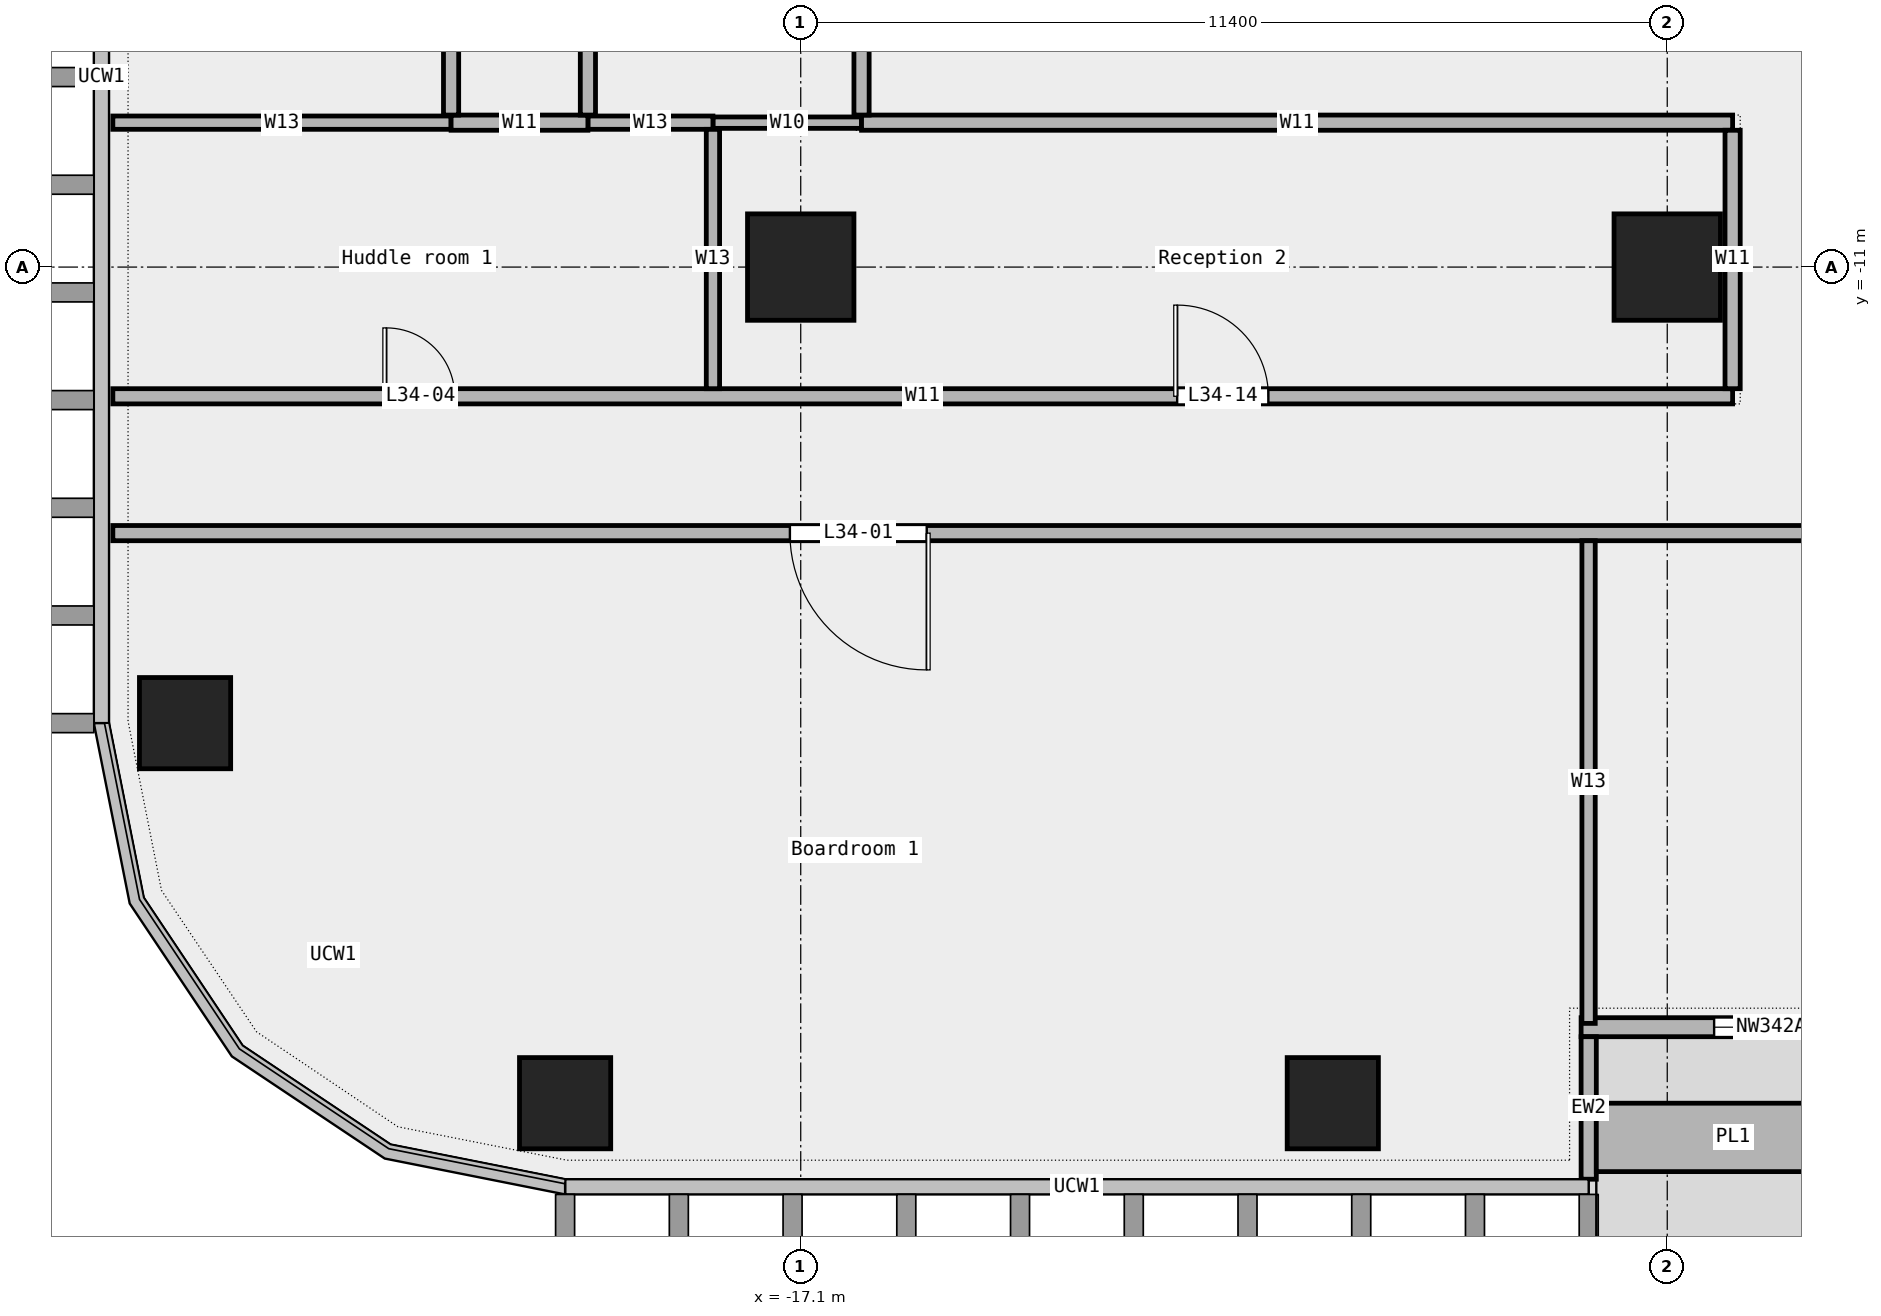
"""IFC4 building model, lengths in metres.
Left out: names, types, materials, properties, quantities, classifications, styles, units other than length and angle.
Written with IfcOpenShell. Run it as: python <this file> out.ifc"""

import sys

from ifc_helpers import new_model, si_unit, direction, frame, frame_2d, origin, origin_2d, place, context, subcontext, project, spatial, rectangle, extrude, element, fill, save


model = new_model("IFC4")
c1 = context("Model", 3, precision=1e-05, world=origin(), true_north=direction((0.0, 1.0)))
c2 = subcontext(c1, "Body", "Model", "MODEL_VIEW")
j1 = project(units=[si_unit("LENGTHUNIT", "METRE"), si_unit("PLANEANGLEUNIT", "RADIAN")], contexts=[c1])
p1 = place(None, origin())
s1 = spatial("IfcSite", under=j1, at=p1, CompositionType="ELEMENT")
p2 = place(p1, origin())
s2 = spatial("IfcBuilding", under=s1, at=p2, CompositionType="ELEMENT")
p3 = place(p2, frame((0.0, 0.0, 169.0)))
s3 = spatial("IfcBuildingStorey", under=s2, at=p3, CompositionType="ELEMENT", Elevation=169.0)
for number, where, z_axis, x_axis in (
    (1, (-20.2, -22.0, 0.0), (0.0, 0.0, 1.0), (1.0, 0.0, 0.0)),
    (2, (-10.1, -22.0, 0.0), (0.0, 0.0, 1.0), (1.0, 0.0, 0.0)),
    (3, (-25.2, -17.0, 0.0), (0.0, 0.0, 1.0), (1.0, 0.0, 0.0)),
):
    element("IfcColumn", number, at=place(p3, frame(where, z_axis=z_axis, x_axis=x_axis)), inside=s3, PredefinedType="COLUMN", context=c2, shape_type="SweptSolid", body=[
        extrude(rectangle(XDim=1.2, YDim=1.2, at=origin_2d()), origin(), (0.0, 0.0, 1.0), 3.6),
    ])
for number, where, z_axis, x_axis in (
    (4, (-17.1, -11.0, 0.0), (0.0, 0.0, 1.0), (1.0, 0.0, 0.0)),
    (5, (-5.7, -11.0, 0.0), (0.0, 0.0, 1.0), (1.0, 0.0, 0.0)),
):
    element("IfcColumn", number, at=place(p3, frame(where, z_axis=z_axis, x_axis=x_axis)), inside=s3, PredefinedType="COLUMN", context=c2, shape_type="SweptSolid", body=[
        extrude(rectangle(XDim=1.4, YDim=1.4, at=origin_2d()), origin(), (0.0, 0.0, 1.0), 3.6),
    ])
p4 = place(p3, frame((-6.833, -21.0, 0.0), z_axis=(0.0, 0.0, 1.0), x_axis=(1.0, 0.0, 0.0)))
e6 = element("IfcWall", 6, at=p4, inside=s3, PredefinedType="STANDARD", context=c2, shape_type="SweptSolid", body=[
    extrude(rectangle(XDim=13.667, YDim=0.25, at=frame_2d((6.833, 0.0))), origin(), (0.0, 0.0, 1.0), 3.6),
])
p5 = place(p4, frame((1.75, 0.0, 0.45)))
e7 = element("IfcOpeningElement", 7, at=p5, cuts=e6, PredefinedType="OPENING", context=c2, shape_type="SweptSolid", body=[
    extrude(rectangle(XDim=1.5, YDim=2.4, at=frame_2d((0.75, 1.2))), frame((0.0, 0.137, 0.0), z_axis=(0.0, -1.0, 0.0), x_axis=(1.0, 0.0, 0.0)), (0.0, 0.0, 1.0), 0.274),
])
p6 = place(p4, frame((7.75, 0.0, 0.0)))
e8 = element("IfcOpeningElement", 8, at=p6, cuts=e6, PredefinedType="OPENING", context=c2, shape_type="SweptSolid", body=[
    extrude(rectangle(XDim=1.8, YDim=2.4, at=frame_2d((0.9, 1.2))), frame((0.0, 0.137, 0.0), z_axis=(0.0, -1.0, 0.0), x_axis=(1.0, 0.0, 0.0)), (0.0, 0.0, 1.0), 0.274),
])
p7 = place(p4, frame((10.5, 0.0, 0.45)))
e9 = element("IfcOpeningElement", 9, at=p7, cuts=e6, PredefinedType="OPENING", context=c2, shape_type="SweptSolid", body=[
    extrude(rectangle(XDim=1.5, YDim=2.4, at=frame_2d((0.75, 1.2))), frame((0.0, 0.137, 0.0), z_axis=(0.0, -1.0, 0.0), x_axis=(1.0, 0.0, 0.0)), (0.0, 0.0, 1.0), 0.274),
])
p8 = place(p3, frame((-6.733, -23.0, 0.0), z_axis=(0.0, 0.0, 1.0), x_axis=(0.0, 1.0, 0.0)))
e10 = element("IfcWall", 10, at=p8, inside=s3, PredefinedType="STANDARD", context=c2, shape_type="SweptSolid", body=[
    extrude(rectangle(XDim=1.875, YDim=0.2, at=frame_2d((0.938, 0.0))), origin(), (0.0, 0.0, 1.0), 3.6),
])
p9 = place(p3, frame((-6.633, -22.45, 0.0), z_axis=(0.0, 0.0, 1.0), x_axis=(1.0, 0.0, 0.0)))
e11 = element("IfcWall", 11, at=p9, inside=s3, PredefinedType="STANDARD", context=c2, shape_type="SweptSolid", body=[
    extrude(rectangle(XDim=3.6, YDim=0.9, at=frame_2d((1.8, 0.0))), origin(), (0.0, 0.0, 1.0), 0.7),
])
p10 = place(p3, frame((-26.15, -14.5, 0.0), z_axis=(0.0, 0.0, 1.0), x_axis=(1.0, 0.0, 0.0)))
e12 = element("IfcWall", 12, at=p10, inside=s3, PredefinedType="PARTITIONING", context=c2, shape_type="SweptSolid", body=[
    extrude(rectangle(XDim=52.3, YDim=0.2, at=frame_2d((26.15, 0.0))), origin(), (0.0, 0.0, 1.0), 3.6),
])
p11 = place(p10, frame((8.907, 0.0, 0.0)))
e13 = element("IfcOpeningElement", 13, at=p11, cuts=e12, PredefinedType="OPENING", context=c2, shape_type="SweptSolid", body=[
    extrude(rectangle(XDim=1.8, YDim=2.1, at=frame_2d((0.9, 1.05))), frame((0.0, 0.112, 0.0), z_axis=(0.0, -1.0, 0.0), x_axis=(1.0, 0.0, 0.0)), (0.0, 0.0, 1.0), 0.224),
])
p12 = place(p10, frame((25.55, 0.0, 0.0)))
e14 = element("IfcOpeningElement", 14, at=p12, cuts=e12, PredefinedType="OPENING", context=c2, shape_type="SweptSolid", body=[
    extrude(rectangle(XDim=1.2, YDim=2.1, at=frame_2d((0.6, 1.05))), frame((0.0, 0.112, 0.0), z_axis=(0.0, -1.0, 0.0), x_axis=(1.0, 0.0, 0.0)), (0.0, 0.0, 1.0), 0.224),
])
p13 = place(p10, frame((41.593, 0.0, 0.0)))
e15 = element("IfcOpeningElement", 15, at=p13, cuts=e12, PredefinedType="OPENING", context=c2, shape_type="SweptSolid", body=[
    extrude(rectangle(XDim=1.8, YDim=2.1, at=frame_2d((0.9, 1.05))), frame((0.0, 0.112, 0.0), z_axis=(0.0, -1.0, 0.0), x_axis=(1.0, 0.0, 0.0)), (0.0, 0.0, 1.0), 0.224),
])
p14 = place(p3, frame((-26.15, -12.7, 0.0), z_axis=(0.0, 0.0, 1.0), x_axis=(1.0, 0.0, 0.0)))
e16 = element("IfcWall", 16, at=p14, inside=s3, PredefinedType="PARTITIONING", context=c2, shape_type="SweptSolid", body=[
    extrude(rectangle(XDim=21.31, YDim=0.2, at=frame_2d((10.655, 0.0))), origin(), (0.0, 0.0, 1.0), 3.6),
])
p15 = place(p14, frame((3.597, 0.0, 0.0)))
e17 = element("IfcOpeningElement", 17, at=p15, cuts=e16, PredefinedType="OPENING", context=c2, shape_type="SweptSolid", body=[
    extrude(rectangle(XDim=0.9, YDim=2.1, at=frame_2d((0.45, 1.05))), frame((0.0, 0.112, 0.0), z_axis=(0.0, -1.0, 0.0), x_axis=(1.0, 0.0, 0.0)), (0.0, 0.0, 1.0), 0.224),
])
p16 = place(p14, frame((14.002, 0.0, 0.0)))
e18 = element("IfcOpeningElement", 18, at=p16, cuts=e16, PredefinedType="OPENING", context=c2, shape_type="SweptSolid", body=[
    extrude(rectangle(XDim=1.2, YDim=2.1, at=frame_2d((0.6, 1.05))), frame((0.0, 0.112, 0.0), z_axis=(0.0, -1.0, 0.0), x_axis=(1.0, 0.0, 0.0)), (0.0, 0.0, 1.0), 0.224),
])
p17 = place(p3, frame((-18.255, -9.1, 0.0), z_axis=(0.0, 0.0, 1.0), x_axis=(1.0, 0.0, 0.0)))
e19 = element("IfcWall", 19, at=p17, inside=s3, PredefinedType="PARTITIONING", context=c2, shape_type="SweptSolid", body=[
    extrude(rectangle(XDim=1.955, YDim=0.15, at=frame_2d((0.978, 0.0))), origin(), (0.0, 0.0, 1.0), 3.6),
])
p18 = place(p3, frame((-26.15, -9.1, 0.0), z_axis=(0.0, 0.0, 1.0), x_axis=(1.0, 0.0, 0.0)))
e20 = element("IfcWall", 20, at=p18, inside=s3, PredefinedType="PARTITIONING", context=c2, shape_type="SweptSolid", body=[
    extrude(rectangle(XDim=4.45, YDim=0.175, at=frame_2d((2.225, 0.0))), origin(), (0.0, 0.0, 1.0), 3.6),
])
p19 = place(p3, frame((-19.9, -9.1, 0.0), z_axis=(0.0, 0.0, 1.0), x_axis=(1.0, 0.0, 0.0)))
e21 = element("IfcWall", 21, at=p19, inside=s3, PredefinedType="PARTITIONING", context=c2, shape_type="SweptSolid", body=[
    extrude(rectangle(XDim=1.645, YDim=0.175, at=frame_2d((0.823, 0.0))), origin(), (0.0, 0.0, 1.0), 3.6),
])
p20 = place(p3, frame((-21.7, -9.1, 0.0), z_axis=(0.0, 0.0, 1.0), x_axis=(1.0, 0.0, 0.0)))
e22 = element("IfcWall", 22, at=p20, inside=s3, PredefinedType="PARTITIONING", context=c2, shape_type="SweptSolid", body=[
    extrude(rectangle(XDim=1.8, YDim=0.2, at=frame_2d((0.9, 0.0))), origin(), (0.0, 0.0, 1.0), 3.6),
])
p21 = place(p3, frame((-16.3, -9.1, 0.0), z_axis=(0.0, 0.0, 1.0), x_axis=(1.0, 0.0, 0.0)))
e23 = element("IfcWall", 23, at=p21, inside=s3, PredefinedType="PARTITIONING", context=c2, shape_type="SweptSolid", body=[
    extrude(rectangle(XDim=11.46, YDim=0.2, at=frame_2d((5.73, 0.0))), origin(), (0.0, 0.0, 1.0), 3.6),
])
p22 = place(p3, frame((-21.7, -9.0, 0.0), z_axis=(0.0, 0.0, 1.0), x_axis=(0.0, 1.0, 0.0)))
e24 = element("IfcWall", 24, at=p22, inside=s3, PredefinedType="PARTITIONING", context=c2, shape_type="SweptSolid", body=[
    extrude(rectangle(XDim=24.3, YDim=0.2, at=frame_2d((12.15, 0.0))), origin(), (0.0, 0.0, 1.0), 3.6),
])
p23 = place(p22, frame((14.925, 0.0, 0.0)))
e25 = element("IfcOpeningElement", 25, at=p23, cuts=e24, PredefinedType="OPENING", context=c2, shape_type="SweptSolid", body=[
    extrude(rectangle(XDim=0.9, YDim=2.1, at=frame_2d((0.45, 1.05))), frame((0.0, 0.112, 0.0), z_axis=(0.0, -1.0, 0.0), x_axis=(1.0, 0.0, 0.0)), (0.0, 0.0, 1.0), 0.224),
])
p24 = place(p22, frame((2.562, 0.0, 0.0)))
e26 = element("IfcOpeningElement", 26, at=p24, cuts=e24, PredefinedType="OPENING", context=c2, shape_type="SweptSolid", body=[
    extrude(rectangle(XDim=0.9, YDim=2.1, at=frame_2d((0.45, 1.05))), frame((0.0, 0.112, 0.0), z_axis=(0.0, -1.0, 0.0), x_axis=(1.0, 0.0, 0.0)), (0.0, 0.0, 1.0), 0.224),
])
p25 = place(p3, frame((-19.9, -9.0, 0.0), z_axis=(0.0, 0.0, 1.0), x_axis=(0.0, 1.0, 0.0)))
e27 = element("IfcWall", 27, at=p25, inside=s3, PredefinedType="PARTITIONING", context=c2, shape_type="SweptSolid", body=[
    extrude(rectangle(XDim=13.6, YDim=0.2, at=frame_2d((6.8, 0.0))), origin(), (0.0, 0.0, 1.0), 3.6),
])
p26 = place(p3, frame((-18.255, -12.6, 0.0), z_axis=(0.0, 0.0, 1.0), x_axis=(0.0, 1.0, 0.0)))
e28 = element("IfcWall", 28, at=p26, inside=s3, PredefinedType="PARTITIONING", context=c2, shape_type="SweptSolid", body=[
    extrude(rectangle(XDim=3.412, YDim=0.175, at=frame_2d((1.706, 0.0))), origin(), (0.0, 0.0, 1.0), 3.6),
])
p27 = place(p3, frame((-16.3, -9.0, 0.0), z_axis=(0.0, 0.0, 1.0), x_axis=(0.0, 1.0, 0.0)))
e29 = element("IfcWall", 29, at=p27, inside=s3, PredefinedType="PARTITIONING", context=c2, shape_type="SweptSolid", body=[
    extrude(rectangle(XDim=8.3, YDim=0.2, at=frame_2d((4.15, 0.0))), origin(), (0.0, 0.0, 1.0), 3.6),
])
p28 = place(p27, frame((3.442, 0.0, 0.0)))
e30 = element("IfcOpeningElement", 30, at=p28, cuts=e29, PredefinedType="OPENING", context=c2, shape_type="SweptSolid", body=[
    extrude(rectangle(XDim=0.9, YDim=2.1, at=frame_2d((0.45, 1.05))), frame((0.0, 0.112, 0.0), z_axis=(0.0, -1.0, 0.0), x_axis=(1.0, 0.0, 0.0)), (0.0, 0.0, 1.0), 0.224),
])
p29 = place(p3, frame((-6.735, -20.95, 0.0), z_axis=(0.0, 0.0, 1.0), x_axis=(0.0, 1.0, 0.0)))
e31 = element("IfcWall", 31, at=p29, inside=s3, PredefinedType="PARTITIONING", context=c2, shape_type="SweptSolid", body=[
    extrude(rectangle(XDim=6.35, YDim=0.175, at=frame_2d((3.175, 0.0))), origin(), (0.0, 0.0, 1.0), 3.6),
])
p30 = place(p3, frame((-4.84, -12.6, 0.0), z_axis=(0.0, 0.0, 1.0), x_axis=(0.0, 1.0, 0.0)))
e32 = element("IfcWall", 32, at=p30, inside=s3, PredefinedType="PARTITIONING", context=c2, shape_type="SweptSolid", body=[
    extrude(rectangle(XDim=3.4, YDim=0.2, at=frame_2d((1.7, 0.0))), origin(), (0.0, 0.0, 1.0), 3.6),
])
p31 = place(p5, origin())
e33 = element("IfcWindow", 33, at=p31, inside=s3, PartitioningType="SINGLE_PANEL", PredefinedType="WINDOW", context=c2, shape_type="SweptSolid", body=[
    extrude(rectangle(XDim=1.5, YDim=2.4, at=frame_2d((0.75, 1.2))), frame((0.0, 0.03, 0.0), z_axis=(0.0, -1.0, 0.0), x_axis=(1.0, 0.0, 0.0)), (0.0, 0.0, 1.0), 0.06),
])
fill(e7, e33)
p32 = place(p11, origin())
e34 = element("IfcDoor", 34, at=p32, inside=s3, OperationType="DOUBLE_DOOR_SINGLE_SWING", PredefinedType="DOOR", context=c2, shape_type="SweptSolid", body=[
    extrude(rectangle(XDim=1.8, YDim=2.1, at=frame_2d((0.9, 1.05))), frame((0.0, 0.025, 0.0), z_axis=(0.0, -1.0, 0.0), x_axis=(1.0, 0.0, 0.0)), (0.0, 0.0, 1.0), 0.05),
])
fill(e13, e34)
p33 = place(p15, origin())
e35 = element("IfcDoor", 35, at=p33, inside=s3, OperationType="SINGLE_SWING_LEFT", PredefinedType="DOOR", context=c2, shape_type="SweptSolid", body=[
    extrude(rectangle(XDim=0.9, YDim=2.1, at=frame_2d((0.45, 1.05))), frame((0.0, 0.025, 0.0), z_axis=(0.0, -1.0, 0.0), x_axis=(1.0, 0.0, 0.0)), (0.0, 0.0, 1.0), 0.05),
])
fill(e17, e35)
p34 = place(p16, origin())
e36 = element("IfcDoor", 36, at=p34, inside=s3, OperationType="SINGLE_SWING_LEFT", PredefinedType="DOOR", context=c2, shape_type="SweptSolid", body=[
    extrude(rectangle(XDim=1.2, YDim=2.1, at=frame_2d((0.6, 1.05))), frame((0.0, 0.025, 0.0), z_axis=(0.0, -1.0, 0.0), x_axis=(1.0, 0.0, 0.0)), (0.0, 0.0, 1.0), 0.05),
])
fill(e18, e36)
save(model, sys.argv[1])
